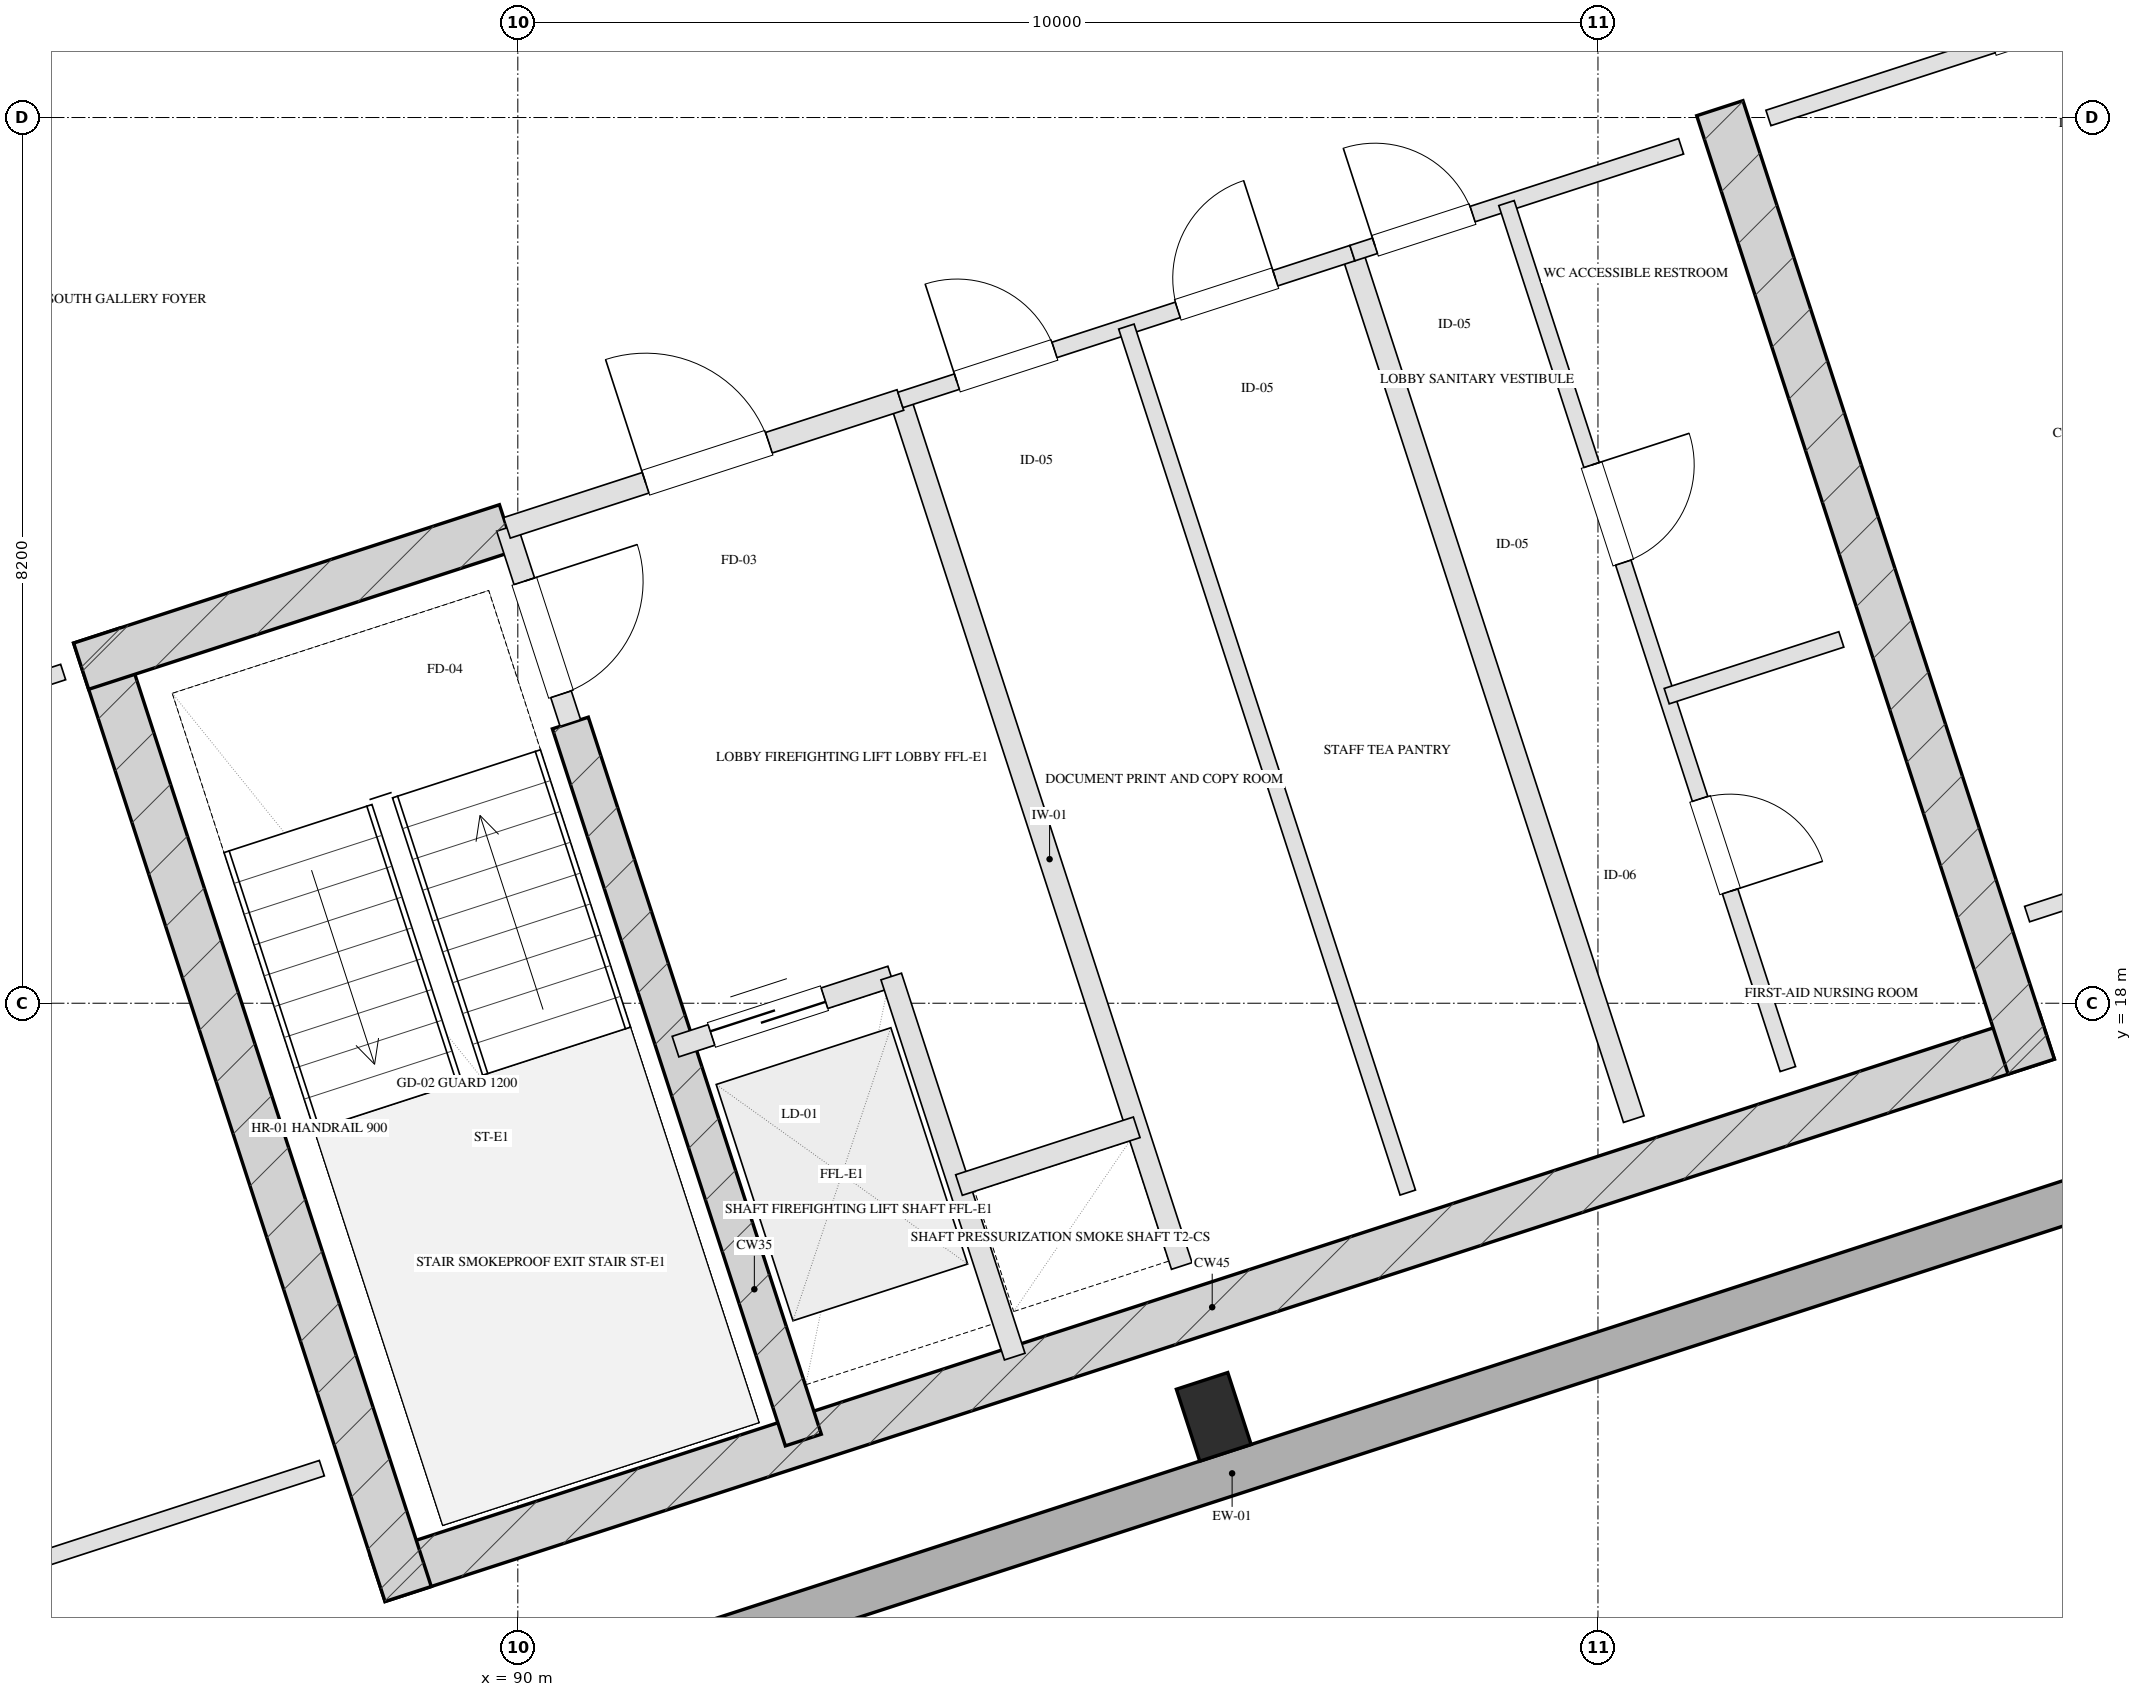
"""IFC4 building model, lengths in metres.
Left out: names, types, materials, properties, quantities, classifications, styles, units other than length and angle.
Written with IfcOpenShell. Run it as: python <this file> out.ifc"""

import sys

from ifc_helpers import new_model, si_unit, direction, frame, frame_2d, origin, origin_2d, place, context, subcontext, project, spatial, rectangle, hollow_rectangle, extrude, element, fill, save


model = new_model("IFC4")
c1 = context("Model", 3, precision=1e-05, world=origin(), true_north=direction((0.0, 1.0)))
c2 = subcontext(c1, "Body", "Model", "MODEL_VIEW")
j1 = project(units=[si_unit("LENGTHUNIT", "METRE"), si_unit("PLANEANGLEUNIT", "RADIAN")], contexts=[c1])
p1 = place(None, origin())
s1 = spatial("IfcSite", under=j1, at=p1, CompositionType="ELEMENT")
p2 = place(p1, origin())
s2 = spatial("IfcBuilding", under=s1, at=p2, CompositionType="ELEMENT")
p3 = place(p2, frame((0.0, 0.0, 216.2)))
s3 = spatial("IfcBuildingStorey", under=s2, at=p3, CompositionType="ELEMENT", Elevation=216.2)
p4 = place(p3, frame((88.701, 12.675, 0.0), z_axis=(0.0, 0.0, 1.0), x_axis=(0.95105824505, 0.309011673763, 0.0)))
e1 = element("IfcWall", 1, at=p4, inside=s3, PredefinedType="SHEAR", context=c2, shape_type="SweptSolid", body=[
    extrude(rectangle(XDim=16.25, YDim=0.45, at=frame_2d((8.125, 0.0))), origin(), (0.0, 0.0, 1.0), 3.45),
])
for number, where, z_axis, x_axis in (
    (2, (86.102, 21.404, 0.0), (0.0, 0.0, 1.0), (0.309, -0.951, 0.0)),
    (3, (101.128, 26.286, 0.0), (0.0, 0.0, 1.0), (0.309, -0.951, 0.0)),
):
    element("IfcWall", number, at=place(p3, frame(where, z_axis=z_axis, x_axis=x_axis)), inside=s3, PredefinedType="SHEAR", context=c2, shape_type="SweptSolid", body=[
        extrude(rectangle(XDim=9.33, YDim=0.45, at=frame_2d((4.665, 0.0))), origin(), (0.0, 0.0, 1.0), 3.45),
    ])
p5 = place(p3, frame((90.486, 20.594, 0.0), z_axis=(0.0, 0.0, 1.0), x_axis=(0.309020428229, -0.951055400562, 0.0)))
e4 = element("IfcWall", 4, at=p5, inside=s3, PredefinedType="SHEAR", context=c2, shape_type="SweptSolid", body=[
    extrude(rectangle(XDim=6.98, YDim=0.35, at=frame_2d((3.49, 0.0))), origin(), (0.0, 0.0, 1.0), 3.45),
])
p6 = place(p3, frame((85.957, 21.12, 0.0), z_axis=(0.0, 0.0, 1.0), x_axis=(0.951064796122, 0.308991510526, 0.0)))
e5 = element("IfcWall", 5, at=p6, inside=s3, PredefinedType="SHEAR", context=c2, shape_type="SweptSolid", body=[
    extrude(rectangle(XDim=4.145, YDim=0.45, at=frame_2d((2.073, 0.0))), origin(), (0.0, 0.0, 1.0), 3.45),
])
p7 = place(p3, frame((96.443, 14.17, 0.0), z_axis=(0.0, 0.0, 1.0), x_axis=(0.951056516295, 0.309016994375, 0.0)))
e6 = element("IfcColumn", 6, at=p7, inside=s3, PredefinedType="COLUMN", context=c2, shape_type="SweptSolid", body=[
    extrude(hollow_rectangle(XDim=0.5, YDim=0.7, WallThickness=0.025, at=origin_2d()), origin(), (0.0, 0.0, 1.0), 3.451),
])
p8 = place(p3, frame((97.382, 56.586, 0.0), z_axis=(0.0, 0.0, 1.0), x_axis=(0.309016491071, -0.951056679828, 0.0)))
e7 = element("IfcWall", 7, at=p8, inside=s3, PredefinedType="SOLIDWALL", context=c2, shape_type="SweptSolid", body=[
    extrude(rectangle(XDim=38.4, YDim=0.4, at=frame_2d((19.2, 0.0))), origin(), (0.0, 0.0, 1.0), 2.55),
])
p9 = place(p8, frame((24.55, 0.0, 0.75)))
e8 = element("IfcOpeningElement", 8, at=p9, cuts=e7, PredefinedType="OPENING", context=c2, shape_type="SweptSolid", body=[
    extrude(rectangle(XDim=2.1, YDim=1.4, at=frame_2d((1.05, 0.7))), frame((0.0, 0.21, 0.0), z_axis=(0.0, -1.0, 0.0), x_axis=(1.0, 0.0, 0.0)), (0.0, 0.0, 1.0), 0.42),
])
p10 = place(p8, frame((20.75, 0.0, 0.75)))
e9 = element("IfcOpeningElement", 9, at=p10, cuts=e7, PredefinedType="OPENING", context=c2, shape_type="SweptSolid", body=[
    extrude(rectangle(XDim=2.1, YDim=1.4, at=frame_2d((1.05, 0.7))), frame((0.0, 0.21, 0.0), z_axis=(0.0, -1.0, 0.0), x_axis=(1.0, 0.0, 0.0)), (0.0, 0.0, 1.0), 0.42),
])
p11 = place(p8, frame((15.55, 0.0, 0.75)))
e10 = element("IfcOpeningElement", 10, at=p11, cuts=e7, PredefinedType="OPENING", context=c2, shape_type="SweptSolid", body=[
    extrude(rectangle(XDim=2.1, YDim=1.4, at=frame_2d((1.05, 0.7))), frame((0.0, 0.21, 0.0), z_axis=(0.0, -1.0, 0.0), x_axis=(1.0, 0.0, 0.0)), (0.0, 0.0, 1.0), 0.42),
])
p12 = place(p8, frame((11.75, 0.0, 0.75)))
e11 = element("IfcOpeningElement", 11, at=p12, cuts=e7, PredefinedType="OPENING", context=c2, shape_type="SweptSolid", body=[
    extrude(rectangle(XDim=2.1, YDim=1.4, at=frame_2d((1.05, 0.7))), frame((0.0, 0.21, 0.0), z_axis=(0.0, -1.0, 0.0), x_axis=(1.0, 0.0, 0.0)), (0.0, 0.0, 1.0), 0.42),
])
p13 = place(p3, frame((107.835, 17.294, 0.0), z_axis=(0.0, 0.0, 1.0), x_axis=(-0.951058012937, -0.309012388148, 0.0)))
e12 = element("IfcWall", 12, at=p13, inside=s3, PredefinedType="SOLIDWALL", context=c2, shape_type="SweptSolid", body=[
    extrude(rectangle(XDim=23.6, YDim=0.4, at=frame_2d((11.8, 0.0))), origin(), (0.0, 0.0, 1.0), 2.55),
])
p14 = place(p3, frame((89.899, 22.401, 0.0), z_axis=(0.0, 0.0, 1.0), x_axis=(0.308932062672, -0.951084108086, 0.0)))
e13 = element("IfcWall", 13, at=p14, inside=s3, PredefinedType="PARTITIONING", context=c2, shape_type="SweptSolid", body=[
    extrude(rectangle(XDim=1.9, YDim=0.2, at=frame_2d((0.95, 0.0))), origin(), (0.0, 0.0, 1.0), 3.155),
])
p15 = place(p14, frame((0.52, 0.0, 0.0)))
e14 = element("IfcOpeningElement", 14, at=p15, cuts=e13, PredefinedType="OPENING", context=c2, shape_type="SweptSolid", body=[
    extrude(rectangle(XDim=1.1, YDim=2.05, at=frame_2d((0.55, 1.025))), frame((0.0, 0.11, 0.0), z_axis=(0.0, -1.0, 0.0), x_axis=(1.0, 0.0, 0.0)), (0.0, 0.0, 1.0), 0.22),
])
p16 = place(p3, frame((93.542, 23.585, 0.0), z_axis=(0.0, 0.0, 1.0), x_axis=(0.309042196757, -0.951048327176, 0.0)))
e15 = element("IfcWall", 15, at=p16, inside=s3, PredefinedType="PARTITIONING", context=c2, shape_type="SweptSolid", body=[
    extrude(rectangle(XDim=8.43, YDim=0.2, at=frame_2d((4.215, 0.0))), origin(), (0.0, 0.0, 1.0), 3.155),
])
p17 = place(p3, frame((89.899, 22.401, 0.0), z_axis=(0.0, 0.0, 1.0), x_axis=(0.951046716504, 0.309047153403, 0.0)))
e16 = element("IfcWall", 16, at=p17, inside=s3, PredefinedType="PARTITIONING", context=c2, shape_type="SweptSolid", body=[
    extrude(rectangle(XDim=3.83, YDim=0.2, at=frame_2d((1.915, 0.0))), origin(), (0.0, 0.0, 1.0), 3.155),
])
p18 = place(p17, frame((1.35, 0.0, 0.0)))
e17 = element("IfcOpeningElement", 17, at=p18, cuts=e16, PredefinedType="OPENING", context=c2, shape_type="SweptSolid", body=[
    extrude(rectangle(XDim=1.2, YDim=2.05, at=frame_2d((0.6, 1.025))), frame((0.0, 0.11, 0.0), z_axis=(0.0, -1.0, 0.0), x_axis=(1.0, 0.0, 0.0)), (0.0, 0.0, 1.0), 0.22),
])
p19 = place(p3, frame((91.46, 17.598, 0.0), z_axis=(0.0, 0.0, 1.0), x_axis=(0.951062257173, 0.308999325213, 0.0)))
e18 = element("IfcWall", 18, at=p19, inside=s3, PredefinedType="PARTITIONING", context=c2, shape_type="SweptSolid", body=[
    extrude(rectangle(XDim=2.1, YDim=0.2, at=frame_2d((1.05, 0.0))), origin(), (0.0, 0.0, 1.0), 3.155),
])
p20 = place(p19, frame((0.35, 0.0, 0.0)))
e19 = element("IfcOpeningElement", 19, at=p20, cuts=e18, PredefinedType="OPENING", context=c2, shape_type="SweptSolid", body=[
    extrude(rectangle(XDim=1.1, YDim=2.05, at=frame_2d((0.55, 1.025))), frame((0.0, 0.11, 0.0), z_axis=(0.0, -1.0, 0.0), x_axis=(1.0, 0.0, 0.0)), (0.0, 0.0, 1.0), 0.22),
])
p21 = place(p3, frame((93.457, 18.247, 0.0), z_axis=(0.0, 0.0, 1.0), x_axis=(0.3089935693, -0.951064127245, 0.0)))
e20 = element("IfcWall", 20, at=p21, inside=s3, PredefinedType="PARTITIONING", context=c2, shape_type="SweptSolid", body=[
    extrude(rectangle(XDim=3.7, YDim=0.2, at=frame_2d((1.85, 0.0))), origin(), (0.0, 0.0, 1.0), 3.155),
])
p22 = place(p3, frame((94.084, 16.317, 0.0), z_axis=(0.0, 0.0, 1.0), x_axis=(0.951041328149, 0.309063734775, 0.0)))
e21 = element("IfcWall", 21, at=p22, inside=s3, PredefinedType="PARTITIONING", context=c2, shape_type="SweptSolid", body=[
    extrude(rectangle(XDim=1.73, YDim=0.2, at=frame_2d((0.865, 0.0))), origin(), (0.0, 0.0, 1.0), 3.155),
])
p23 = place(p3, frame((97.727, 24.944, 0.0), z_axis=(0.0, 0.0, 1.0), x_axis=(0.309016001439, -0.951056838919, 0.0)))
e22 = element("IfcWall", 22, at=p23, inside=s3, PredefinedType="PARTITIONING", context=c2, shape_type="SweptSolid", body=[
    extrude(rectangle(XDim=8.43, YDim=0.2, at=frame_2d((4.215, 0.0))), origin(), (0.0, 0.0, 1.0), 3.155),
])
p24 = place(p3, frame((93.542, 23.585, 0.0), z_axis=(0.0, 0.0, 1.0), x_axis=(0.951063829732, 0.308994485023, 0.0)))
e23 = element("IfcWall", 23, at=p24, inside=s3, PredefinedType="PARTITIONING", context=c2, shape_type="SweptSolid", body=[
    extrude(rectangle(XDim=4.4, YDim=0.15, at=frame_2d((2.2, 0.0))), origin(), (0.0, 0.0, 1.0), 3.155),
])
p25 = place(p24, frame((0.55, 0.0, 0.0)))
e24 = element("IfcOpeningElement", 24, at=p25, cuts=e23, PredefinedType="OPENING", context=c2, shape_type="SweptSolid", body=[
    extrude(rectangle(XDim=0.95, YDim=2.05, at=frame_2d((0.475, 1.025))), frame((0.0, 0.085, 0.0), z_axis=(0.0, -1.0, 0.0), x_axis=(1.0, 0.0, 0.0)), (0.0, 0.0, 1.0), 0.17),
])
p26 = place(p24, frame((2.7, 0.0, 0.0)))
e25 = element("IfcOpeningElement", 25, at=p26, cuts=e23, PredefinedType="OPENING", context=c2, shape_type="SweptSolid", body=[
    extrude(rectangle(XDim=0.95, YDim=2.05, at=frame_2d((0.475, 1.025))), frame((0.0, 0.085, 0.0), z_axis=(0.0, -1.0, 0.0), x_axis=(1.0, 0.0, 0.0)), (0.0, 0.0, 1.0), 0.17),
])
p27 = place(p3, frame((95.634, 24.265, 0.0), z_axis=(0.0, 0.0, 1.0), x_axis=(0.309007490203, -0.951059604335, 0.0)))
e26 = element("IfcWall", 26, at=p27, inside=s3, PredefinedType="PARTITIONING", context=c2, shape_type="SweptSolid", body=[
    extrude(rectangle(XDim=8.43, YDim=0.15, at=frame_2d((4.215, 0.0))), origin(), (0.0, 0.0, 1.0), 3.155),
])
p28 = place(p3, frame((97.727, 24.944, 0.0), z_axis=(0.0, 0.0, 1.0), x_axis=(0.951036872128, 0.309077446369, 0.0)))
e27 = element("IfcWall", 27, at=p28, inside=s3, PredefinedType="PARTITIONING", context=c2, shape_type="SweptSolid", body=[
    extrude(rectangle(XDim=3.2, YDim=0.15, at=frame_2d((1.6, 0.0))), origin(), (0.0, 0.0, 1.0), 3.155),
])
p29 = place(p28, frame((0.22, 0.0, 0.0)))
e28 = element("IfcOpeningElement", 28, at=p29, cuts=e27, PredefinedType="OPENING", context=c2, shape_type="SweptSolid", body=[
    extrude(rectangle(XDim=0.95, YDim=2.05, at=frame_2d((0.475, 1.025))), frame((0.0, 0.085, 0.0), z_axis=(0.0, -1.0, 0.0), x_axis=(1.0, 0.0, 0.0)), (0.0, 0.0, 1.0), 0.17),
])
p30 = place(p3, frame((99.153, 25.408, 0.0), z_axis=(0.0, 0.0, 1.0), x_axis=(0.309016001439, -0.951056838919, 0.0)))
e29 = element("IfcWall", 29, at=p30, inside=s3, PredefinedType="PARTITIONING", context=c2, shape_type="SweptSolid", body=[
    extrude(rectangle(XDim=8.43, YDim=0.15, at=frame_2d((4.215, 0.0))), origin(), (0.0, 0.0, 1.0), 3.155),
])
p31 = place(p30, frame((2.55, 0.0, 0.0)))
e30 = element("IfcOpeningElement", 30, at=p31, cuts=e29, PredefinedType="OPENING", context=c2, shape_type="SweptSolid", body=[
    extrude(rectangle(XDim=0.95, YDim=2.05, at=frame_2d((0.475, 1.025))), frame((0.0, 0.085, 0.0), z_axis=(0.0, -1.0, 0.0), x_axis=(1.0, 0.0, 0.0)), (0.0, 0.0, 1.0), 0.17),
])
p32 = place(p30, frame((5.8, 0.0, 0.0)))
e31 = element("IfcOpeningElement", 31, at=p32, cuts=e29, PredefinedType="OPENING", context=c2, shape_type="SweptSolid", body=[
    extrude(rectangle(XDim=0.9, YDim=2.05, at=frame_2d((0.45, 1.025))), frame((0.0, 0.085, 0.0), z_axis=(0.0, -1.0, 0.0), x_axis=(1.0, 0.0, 0.0)), (0.0, 0.0, 1.0), 0.17),
])
p33 = place(p3, frame((100.636, 20.843, 0.0), z_axis=(0.0, 0.0, 1.0), x_axis=(0.951040401051, 0.309066587596, 0.0)))
e32 = element("IfcWall", 32, at=p33, inside=s3, PredefinedType="PARTITIONING", context=c2, shape_type="SweptSolid", body=[
    extrude(rectangle(XDim=1.7, YDim=0.15, at=frame_2d((0.85, 0.0))), origin(), (0.0, 0.0, 1.0), 3.155),
])
p34 = place(p3, frame((82.669, 11.903, 0.0), z_axis=(0.0, 0.0, 1.0), x_axis=(0.951059431056, 0.309008023519, 0.0)))
e33 = element("IfcWall", 33, at=p34, inside=s3, PredefinedType="PARTITIONING", context=c2, shape_type="SweptSolid", body=[
    extrude(rectangle(XDim=5.8, YDim=0.15, at=frame_2d((2.9, 0.0))), origin(), (0.0, 0.0, 1.0), 3.155),
])
p35 = place(p3, frame((80.275, 19.274, 0.0), z_axis=(0.0, 0.0, 1.0), x_axis=(0.951059431056, 0.309008023519, 0.0)))
e34 = element("IfcWall", 34, at=p35, inside=s3, PredefinedType="PARTITIONING", context=c2, shape_type="SweptSolid", body=[
    extrude(rectangle(XDim=5.8, YDim=0.15, at=frame_2d((2.9, 0.0))), origin(), (0.0, 0.0, 1.0), 3.155),
])
p36 = place(p35, frame((2.436, 0.0, 0.0)))
e35 = element("IfcOpeningElement", 35, at=p36, cuts=e34, PredefinedType="OPENING", context=c2, shape_type="SweptSolid", body=[
    extrude(rectangle(XDim=1.0, YDim=2.05, at=frame_2d((0.5, 1.025))), frame((0.0, 0.085, 0.0), z_axis=(0.0, -1.0, 0.0), x_axis=(1.0, 0.0, 0.0)), (0.0, 0.0, 1.0), 0.17),
])
p37 = place(p3, frame((103.973, 18.825, 0.0), z_axis=(0.0, 0.0, 1.0), x_axis=(0.951055112834, 0.309021313752, 0.0)))
e36 = element("IfcWall", 36, at=p37, inside=s3, PredefinedType="PARTITIONING", context=c2, shape_type="SweptSolid", body=[
    extrude(rectangle(XDim=5.2, YDim=0.15, at=frame_2d((2.6, 0.0))), origin(), (0.0, 0.0, 1.0), 3.155),
])
p38 = place(p3, frame((101.578, 26.196, 0.0), z_axis=(0.0, 0.0, 1.0), x_axis=(0.951064427824, 0.308992644131, 0.0)))
e37 = element("IfcWall", 37, at=p38, inside=s3, PredefinedType="PARTITIONING", context=c2, shape_type="SweptSolid", body=[
    extrude(rectangle(XDim=5.2, YDim=0.15, at=frame_2d((2.6, 0.0))), origin(), (0.0, 0.0, 1.0), 3.155),
])
p39 = place(p38, frame((2.184, 0.0, 0.0)))
e38 = element("IfcOpeningElement", 38, at=p39, cuts=e37, PredefinedType="OPENING", context=c2, shape_type="SweptSolid", body=[
    extrude(rectangle(XDim=1.0, YDim=2.05, at=frame_2d((0.5, 1.025))), frame((0.0, 0.085, 0.0), z_axis=(0.0, -1.0, 0.0), x_axis=(1.0, 0.0, 0.0)), (0.0, 0.0, 1.0), 0.17),
])
p40 = place(p3, frame((78.266, 25.456, 0.0), z_axis=(0.0, 0.0, 1.0), x_axis=(0.951055402118, 0.30902042344, 0.0)))
e39 = element("IfcWall", 39, at=p40, inside=s3, PredefinedType="PARTITIONING", context=c2, shape_type="SweptSolid", body=[
    extrude(rectangle(XDim=10.175, YDim=0.15, at=frame_2d((5.087, 0.0))), origin(), (0.0, 0.0, 1.0), 3.155),
])
p41 = place(p15, origin())
e40 = element("IfcDoor", 40, at=p41, inside=s3, OperationType="SINGLE_SWING_LEFT", PredefinedType="DOOR", context=c2, shape_type="SweptSolid", body=[
    extrude(rectangle(XDim=1.1, YDim=2.05, at=frame_2d((0.55, 1.025))), frame((0.0, 0.025, 0.0), z_axis=(0.0, -1.0, 0.0), x_axis=(1.0, 0.0, 0.0)), (0.0, 0.0, 1.0), 0.05),
])
fill(e14, e40)
p42 = place(p18, origin())
e41 = element("IfcDoor", 41, at=p42, inside=s3, OperationType="SINGLE_SWING_LEFT", PredefinedType="DOOR", context=c2, shape_type="SweptSolid", body=[
    extrude(rectangle(XDim=1.2, YDim=2.05, at=frame_2d((0.6, 1.025))), frame((0.0, 0.025, 0.0), z_axis=(0.0, -1.0, 0.0), x_axis=(1.0, 0.0, 0.0)), (0.0, 0.0, 1.0), 0.05),
])
fill(e17, e41)
p43 = place(p20, origin())
e42 = element("IfcDoor", 42, at=p43, inside=s3, OperationType="DOUBLE_DOOR_SLIDING", PredefinedType="DOOR", context=c2, shape_type="SweptSolid", body=[
    extrude(rectangle(XDim=1.1, YDim=2.05, at=frame_2d((0.55, 1.025))), frame((0.0, 0.025, 0.0), z_axis=(0.0, -1.0, 0.0), x_axis=(1.0, 0.0, 0.0)), (0.0, 0.0, 1.0), 0.05),
])
fill(e19, e42)
p44 = place(p25, origin())
e43 = element("IfcDoor", 43, at=p44, inside=s3, OperationType="SINGLE_SWING_LEFT", PredefinedType="DOOR", context=c2, shape_type="SweptSolid", body=[
    extrude(rectangle(XDim=0.95, YDim=2.05, at=frame_2d((0.475, 1.025))), frame((0.0, 0.025, 0.0), z_axis=(0.0, -1.0, 0.0), x_axis=(1.0, 0.0, 0.0)), (0.0, 0.0, 1.0), 0.05),
])
fill(e24, e43)
p45 = place(p26, origin())
e44 = element("IfcDoor", 44, at=p45, inside=s3, OperationType="SINGLE_SWING_RIGHT", PredefinedType="DOOR", context=c2, shape_type="SweptSolid", body=[
    extrude(rectangle(XDim=0.95, YDim=2.05, at=frame_2d((0.475, 1.025))), frame((0.0, 0.025, 0.0), z_axis=(0.0, -1.0, 0.0), x_axis=(1.0, 0.0, 0.0)), (0.0, 0.0, 1.0), 0.05),
])
fill(e25, e44)
p46 = place(p29, origin())
e45 = element("IfcDoor", 45, at=p46, inside=s3, OperationType="SINGLE_SWING_LEFT", PredefinedType="DOOR", context=c2, shape_type="SweptSolid", body=[
    extrude(rectangle(XDim=0.95, YDim=2.05, at=frame_2d((0.475, 1.025))), frame((0.0, 0.025, 0.0), z_axis=(0.0, -1.0, 0.0), x_axis=(1.0, 0.0, 0.0)), (0.0, 0.0, 1.0), 0.05),
])
fill(e28, e45)
p47 = place(p31, origin())
e46 = element("IfcDoor", 46, at=p47, inside=s3, OperationType="SINGLE_SWING_LEFT", PredefinedType="DOOR", context=c2, shape_type="SweptSolid", body=[
    extrude(rectangle(XDim=0.95, YDim=2.05, at=frame_2d((0.475, 1.025))), frame((0.0, 0.025, 0.0), z_axis=(0.0, -1.0, 0.0), x_axis=(1.0, 0.0, 0.0)), (0.0, 0.0, 1.0), 0.05),
])
fill(e30, e46)
p48 = place(p32, origin())
e47 = element("IfcDoor", 47, at=p48, inside=s3, OperationType="SINGLE_SWING_RIGHT", PredefinedType="DOOR", context=c2, shape_type="SweptSolid", body=[
    extrude(rectangle(XDim=0.9, YDim=2.05, at=frame_2d((0.45, 1.025))), frame((0.0, 0.025, 0.0), z_axis=(0.0, -1.0, 0.0), x_axis=(1.0, 0.0, 0.0)), (0.0, 0.0, 1.0), 0.05),
])
fill(e31, e47)
save(model, sys.argv[1])
